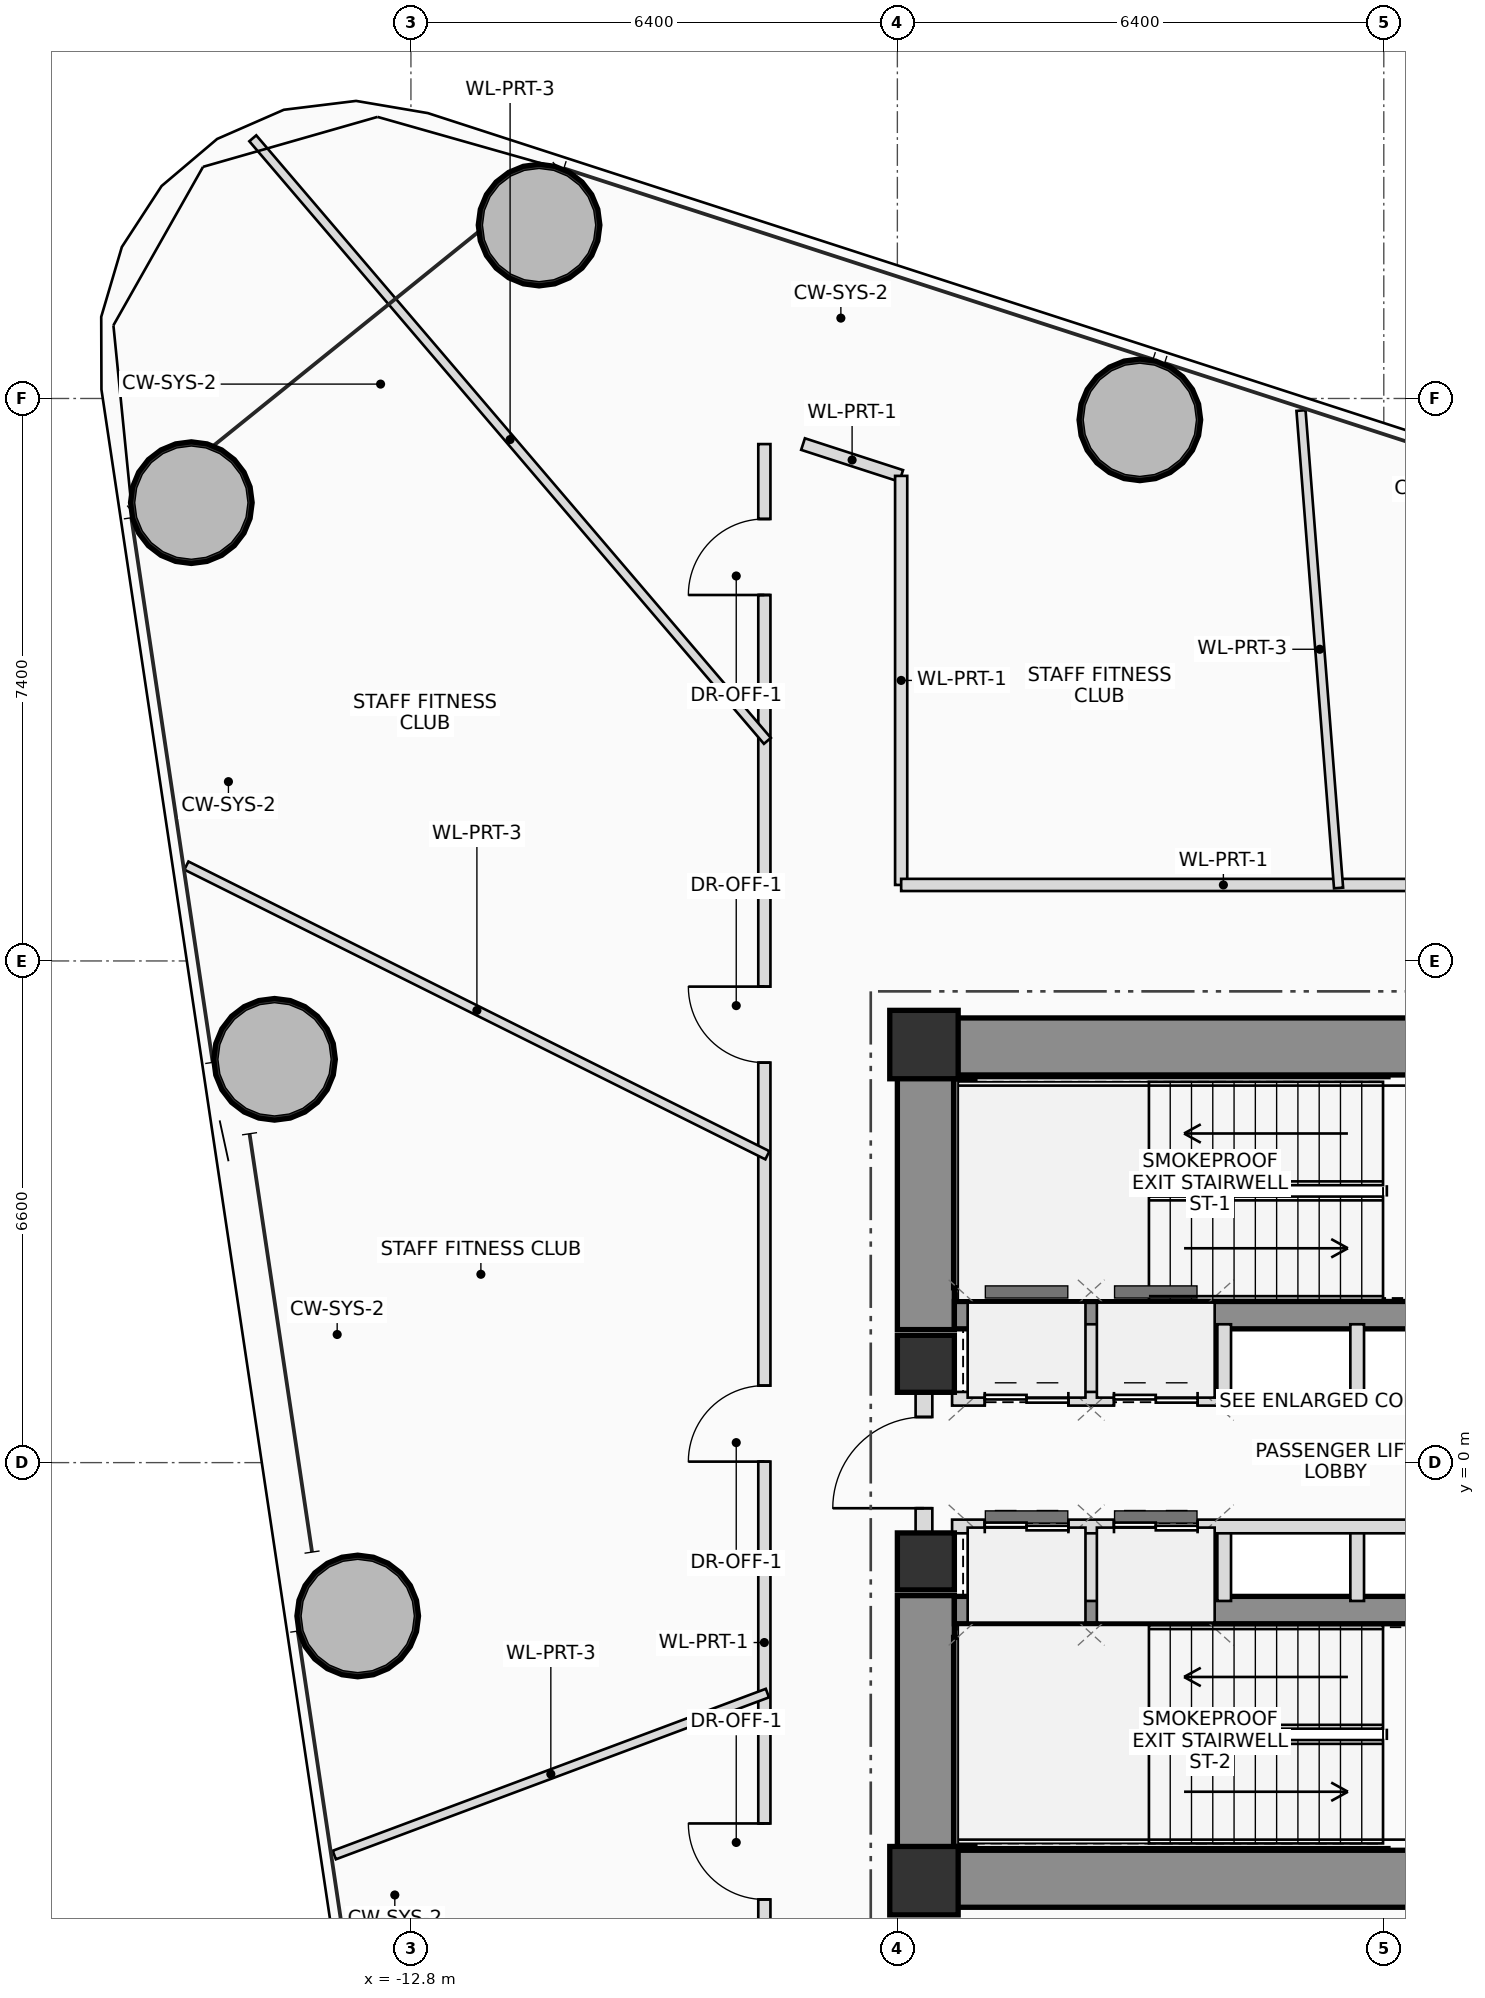
"""IFC4 building model, lengths in metres.
Left out: names, types, materials, properties, quantities, classifications, styles, units other than length and angle.
Written with IfcOpenShell. Run it as: python <this file> out.ifc"""

import sys

from ifc_helpers import new_model, si_unit, direction, frame, frame_2d, origin, origin_2d, place, context, subcontext, project, spatial, rectangle, hollow_circle, extrude, source, transform, mapped, element, fill, save


model = new_model("IFC4")
c1 = context("Model", 3, precision=1e-05, world=origin(), true_north=direction((0.0, 1.0)))
c2 = subcontext(c1, "Body", "Model", "MODEL_VIEW")
j1 = project(units=[si_unit("LENGTHUNIT", "METRE"), si_unit("PLANEANGLEUNIT", "RADIAN")], contexts=[c1])
p1 = place(None, origin())
s1 = spatial("IfcSite", under=j1, at=p1, CompositionType="ELEMENT")
p2 = place(p1, origin())
s2 = spatial("IfcBuilding", under=s1, at=p2, CompositionType="ELEMENT")
p3 = place(p2, frame((0.0, 0.0, 77.3)))
s3 = spatial("IfcBuildingStorey", under=s2, at=p3, CompositionType="ELEMENT", Elevation=77.3)
m1 = source(origin(), c2, "Body", "SweptSolid", [
    extrude(rectangle(XDim=0.9, YDim=0.9, at=origin_2d()), origin(), (0.0, 0.0, 1.0), 3.75),
])
for number, where, z_axis, x_axis in (
    (1, (-6.05, -5.5, 0.0), (0.0, 0.0, 1.0), (1.0, 0.0, 0.0)),
    (2, (-6.05, 5.5, 0.0), (0.0, 0.0, 1.0), (1.0, 0.0, 0.0)),
):
    element("IfcColumn", number, at=place(p3, frame(where, z_axis=z_axis, x_axis=x_axis)), inside=s3, PredefinedType="COLUMN", context=c2, shape_type="MappedRepresentation", body=[
        mapped(m1, transform((0.0, 0.0, 0.0), scale=1.0)),
    ])
p4 = place(p3, frame((-6.4, 5.475, 0.0), z_axis=(0.0, 0.0, 1.0), x_axis=(1.0, 0.0, 0.0)))
e3 = element("IfcWall", 3, at=p4, inside=s3, PredefinedType="SHEAR", context=c2, shape_type="SweptSolid", body=[
    extrude(rectangle(XDim=12.8, YDim=0.75, at=frame_2d((6.4, 0.0))), origin(), (0.0, 0.0, 1.0), 3.75),
])
p5 = place(p4, frame((8.6, 0.0, 0.0)))
e4 = element("IfcOpeningElement", 4, at=p5, cuts=e3, PredefinedType="OPENING", context=c2, shape_type="SweptSolid", body=[
    extrude(rectangle(XDim=1.2, YDim=2.2, at=frame_2d((0.6, 1.1))), frame((0.0, 0.385, 0.0), z_axis=(0.0, -1.0, 0.0), x_axis=(1.0, 0.0, 0.0)), (0.0, 0.0, 1.0), 0.77),
])
p6 = place(p3, frame((-6.4, -5.475, 0.0), z_axis=(0.0, 0.0, 1.0), x_axis=(1.0, 0.0, 0.0)))
e5 = element("IfcWall", 5, at=p6, inside=s3, PredefinedType="SHEAR", context=c2, shape_type="SweptSolid", body=[
    extrude(rectangle(XDim=12.8, YDim=0.75, at=frame_2d((6.4, 0.0))), origin(), (0.0, 0.0, 1.0), 3.75),
])
p7 = place(p6, frame((8.6, 0.0, 0.0)))
e6 = element("IfcOpeningElement", 6, at=p7, cuts=e5, PredefinedType="OPENING", context=c2, shape_type="SweptSolid", body=[
    extrude(rectangle(XDim=1.2, YDim=2.2, at=frame_2d((0.6, 1.1))), frame((0.0, 0.385, 0.0), z_axis=(0.0, -1.0, 0.0), x_axis=(1.0, 0.0, 0.0)), (0.0, 0.0, 1.0), 0.77),
])
for number, where, z_axis, x_axis in (
    (7, (-6.025, -5.1, 0.0), (0.0, 0.0, 1.0), (0.0, 1.0, 0.0)),
    (8, (-6.025, 1.75, 0.0), (0.0, 0.0, 1.0), (0.0, 1.0, 0.0)),
):
    element("IfcWall", number, at=place(p3, frame(where, z_axis=z_axis, x_axis=x_axis)), inside=s3, PredefinedType="SHEAR", context=c2, shape_type="SweptSolid", body=[
        extrude(rectangle(XDim=3.35, YDim=0.75, at=frame_2d((1.675, 0.0))), origin(), (0.0, 0.0, 1.0), 3.75),
    ])
for number, where, z_axis, x_axis in (
    (9, (-5.65, 1.94, 0.0), (0.0, 0.0, 1.0), (1.0, 0.0, 0.0)),
    (10, (-5.65, -1.94, 0.0), (0.0, 0.0, 1.0), (1.0, 0.0, 0.0)),
):
    element("IfcWall", number, at=place(p3, frame(where, z_axis=z_axis, x_axis=x_axis)), inside=s3, PredefinedType="SHEAR", context=c2, shape_type="SweptSolid", body=[
        extrude(rectangle(XDim=11.3, YDim=0.36, at=frame_2d((5.65, 0.0))), origin(), (0.0, 0.0, 1.0), 3.75),
    ])
for number, where, z_axis, x_axis in (
    (11, (-5.52, 2.3, 0.0), (0.0, 0.0, 1.0), (0.0, 1.0, 0.0)),
    (12, (-5.52, -5.05, 0.0), (0.0, 0.0, 1.0), (0.0, 1.0, 0.0)),
):
    element("IfcWall", number, at=place(p3, frame(where, z_axis=z_axis, x_axis=x_axis)), inside=s3, PredefinedType="SHEAR", context=c2, shape_type="SweptSolid", body=[
        extrude(rectangle(XDim=2.75, YDim=0.28, at=frame_2d((1.375, 0.0))), origin(), (0.0, 0.0, 1.0), 3.75),
    ])
m2 = source(origin(), c2, "Body", "SweptSolid", [
    extrude(rectangle(XDim=0.75, YDim=0.75, at=origin_2d()), origin(), (0.0, 0.0, 1.0), 3.75),
])
for number, where, z_axis, x_axis in (
    (13, (-6.025, -1.3, 0.0), (0.0, 0.0, 1.0), (1.0, 0.0, 0.0)),
    (14, (-6.025, 1.3, 0.0), (0.0, 0.0, 1.0), (1.0, 0.0, 0.0)),
):
    element("IfcColumn", number, at=place(p3, frame(where, z_axis=z_axis, x_axis=x_axis)), inside=s3, PredefinedType="COLUMN", context=c2, shape_type="MappedRepresentation", body=[
        mapped(m2, transform((0.0, 0.0, 0.0), scale=1.0)),
    ])
m3 = source(origin(), c2, "Body", "SweptSolid", [
    extrude(hollow_circle(Radius=0.8, WallThickness=0.055, at=origin_2d()), origin(), (0.0, 0.0, 1.0), 3.75),
])
for number, where, z_axis, x_axis in (
    (15, (-3.21, 13.719, 0.0), (0.0, 0.0, 1.0), (1.0, 0.0, 0.0)),
    (16, (-11.114, 16.281, 0.0), (0.0, 0.0, 1.0), (1.0, 0.0, 0.0)),
    (17, (-15.689, 12.629, 0.0), (0.0, 0.0, 1.0), (1.0, 0.0, 0.0)),
    (18, (-14.594, 5.306, 0.0), (0.0, 0.0, 1.0), (1.0, 0.0, 0.0)),
    (19, (-13.5, -2.018, 0.0), (0.0, 0.0, 1.0), (1.0, 0.0, 0.0)),
):
    element("IfcColumn", number, at=place(p3, frame(where, z_axis=z_axis, x_axis=x_axis)), inside=s3, PredefinedType="COLUMN", context=c2, shape_type="MappedRepresentation", body=[
        mapped(m3, transform((0.0, 0.0, 0.0), scale=1.0)),
    ])
p8 = place(p3, frame((-6.05, -0.95, 0.0), z_axis=(0.0, 0.0, 1.0), x_axis=(0.0, 1.0, 0.0)))
e20 = element("IfcWall", 20, at=p8, inside=s3, PredefinedType="PLUMBINGWALL", context=c2, shape_type="SweptSolid", body=[
    extrude(rectangle(XDim=1.9, YDim=0.22, at=frame_2d((0.95, 0.0))), origin(), (0.0, 0.0, 1.0), 2.525),
])
p9 = place(p8, frame((0.35, 0.0, 0.0)))
e21 = element("IfcOpeningElement", 21, at=p9, cuts=e20, PredefinedType="OPENING", context=c2, shape_type="SweptSolid", body=[
    extrude(rectangle(XDim=1.2, YDim=2.2, at=frame_2d((0.6, 1.1))), frame((0.0, 0.12, 0.0), z_axis=(0.0, -1.0, 0.0), x_axis=(1.0, 0.0, 0.0)), (0.0, 0.0, 1.0), 0.24),
])
for number, where, z_axis, x_axis in (
    (22, (-3.85, 0.84, 0.0), (0.0, 0.0, 1.0), (0.0, 1.0, 0.0)),
    (23, (-3.85, -1.82, 0.0), (0.0, 0.0, 1.0), (0.0, 1.0, 0.0)),
    (24, (-2.1, 0.84, 0.0), (0.0, 0.0, 1.0), (0.0, 1.0, 0.0)),
    (25, (-2.1, -1.82, 0.0), (0.0, 0.0, 1.0), (0.0, 1.0, 0.0)),
    (26, (-0.35, 0.84, 0.0), (0.0, 0.0, 1.0), (0.0, 1.0, 0.0)),
    (27, (-0.35, -1.82, 0.0), (0.0, 0.0, 1.0), (0.0, 1.0, 0.0)),
):
    element("IfcWall", number, at=place(p3, frame(where, z_axis=z_axis, x_axis=x_axis)), inside=s3, PredefinedType="PLUMBINGWALL", context=c2, shape_type="SweptSolid", body=[
        extrude(rectangle(XDim=0.98, YDim=0.18, at=frame_2d((0.49, 0.0))), origin(), (0.0, 0.0, 1.0), 3.545),
    ])
p10 = place(p3, frame((-5.68, 0.84, 0.0), z_axis=(0.0, 0.0, 1.0), x_axis=(1.0, 0.0, 0.0)))
e28 = element("IfcWall", 28, at=p10, inside=s3, PredefinedType="PLUMBINGWALL", context=c2, shape_type="SweptSolid", body=[
    extrude(rectangle(XDim=10.26, YDim=0.18, at=frame_2d((5.13, 0.0))), origin(), (0.0, 0.0, 1.0), 3.545),
])
p11 = place(p10, frame((0.43, 0.0, 0.0)))
e29 = element("IfcOpeningElement", 29, at=p11, cuts=e28, PredefinedType="OPENING", context=c2, shape_type="SweptSolid", body=[
    extrude(rectangle(XDim=1.1, YDim=2.2, at=frame_2d((0.55, 1.1))), frame((0.0, 0.1, 0.0), z_axis=(0.0, -1.0, 0.0), x_axis=(1.0, 0.0, 0.0)), (0.0, 0.0, 1.0), 0.2),
])
p12 = place(p10, frame((2.13, 0.0, 0.0)))
e30 = element("IfcOpeningElement", 30, at=p12, cuts=e28, PredefinedType="OPENING", context=c2, shape_type="SweptSolid", body=[
    extrude(rectangle(XDim=1.1, YDim=2.2, at=frame_2d((0.55, 1.1))), frame((0.0, 0.1, 0.0), z_axis=(0.0, -1.0, 0.0), x_axis=(1.0, 0.0, 0.0)), (0.0, 0.0, 1.0), 0.2),
])
p13 = place(p3, frame((-5.68, -0.84, 0.0), z_axis=(0.0, 0.0, 1.0), x_axis=(1.0, 0.0, 0.0)))
e31 = element("IfcWall", 31, at=p13, inside=s3, PredefinedType="PLUMBINGWALL", context=c2, shape_type="SweptSolid", body=[
    extrude(rectangle(XDim=8.7, YDim=0.18, at=frame_2d((4.35, 0.0))), origin(), (0.0, 0.0, 1.0), 3.545),
])
p14 = place(p13, frame((0.43, 0.0, 0.0)))
e32 = element("IfcOpeningElement", 32, at=p14, cuts=e31, PredefinedType="OPENING", context=c2, shape_type="SweptSolid", body=[
    extrude(rectangle(XDim=1.1, YDim=2.2, at=frame_2d((0.55, 1.1))), frame((0.0, 0.1, 0.0), z_axis=(0.0, -1.0, 0.0), x_axis=(1.0, 0.0, 0.0)), (0.0, 0.0, 1.0), 0.2),
])
p15 = place(p13, frame((2.13, 0.0, 0.0)))
e33 = element("IfcOpeningElement", 33, at=p15, cuts=e31, PredefinedType="OPENING", context=c2, shape_type="SweptSolid", body=[
    extrude(rectangle(XDim=1.1, YDim=2.2, at=frame_2d((0.55, 1.1))), frame((0.0, 0.1, 0.0), z_axis=(0.0, -1.0, 0.0), x_axis=(1.0, 0.0, 0.0)), (0.0, 0.0, 1.0), 0.2),
])
p16 = place(p3, frame((-8.15, -7.6, 0.0), z_axis=(0.0, 0.0, 1.0), x_axis=(0.0, 1.0, 0.0)))
e34 = element("IfcWall", 34, at=p16, inside=s3, PredefinedType="PARTITIONING", context=c2, shape_type="SweptSolid", body=[
    extrude(rectangle(XDim=15.2, YDim=0.16, at=frame_2d((7.6, 0.0))), origin(), (0.0, 0.0, 1.0), 2.85),
])
p17 = place(p16, frame((1.853, 0.0, 0.0)))
e35 = element("IfcOpeningElement", 35, at=p17, cuts=e34, PredefinedType="OPENING", context=c2, shape_type="SweptSolid", body=[
    extrude(rectangle(XDim=1.0, YDim=2.25, at=frame_2d((0.5, 1.125))), frame((0.0, 0.09, 0.0), z_axis=(0.0, -1.0, 0.0), x_axis=(1.0, 0.0, 0.0)), (0.0, 0.0, 1.0), 0.18),
])
p18 = place(p16, frame((7.613, 0.0, 0.0)))
e36 = element("IfcOpeningElement", 36, at=p18, cuts=e34, PredefinedType="OPENING", context=c2, shape_type="SweptSolid", body=[
    extrude(rectangle(XDim=1.0, YDim=2.25, at=frame_2d((0.5, 1.125))), frame((0.0, 0.09, 0.0), z_axis=(0.0, -1.0, 0.0), x_axis=(1.0, 0.0, 0.0)), (0.0, 0.0, 1.0), 0.18),
])
p19 = place(p16, frame((12.862, 0.0, 0.0)))
e37 = element("IfcOpeningElement", 37, at=p19, cuts=e34, PredefinedType="OPENING", context=c2, shape_type="SweptSolid", body=[
    extrude(rectangle(XDim=1.0, YDim=2.25, at=frame_2d((0.5, 1.125))), frame((0.0, 0.09, 0.0), z_axis=(0.0, -1.0, 0.0), x_axis=(1.0, 0.0, 0.0)), (0.0, 0.0, 1.0), 0.18),
])
p20 = place(p3, frame((-8.15, 7.6, 0.0), z_axis=(0.0, 0.0, 1.0), x_axis=(0.0, 1.0, 0.0)))
e38 = element("IfcWall", 38, at=p20, inside=s3, PredefinedType="PARTITIONING", context=c2, shape_type="SweptSolid", body=[
    extrude(rectangle(XDim=5.8, YDim=0.16, at=frame_2d((2.9, 0.0))), origin(), (0.0, 0.0, 1.0), 2.85),
])
p21 = place(p20, frame((3.815, 0.0, 0.0)))
e39 = element("IfcOpeningElement", 39, at=p21, cuts=e38, PredefinedType="OPENING", context=c2, shape_type="SweptSolid", body=[
    extrude(rectangle(XDim=1.0, YDim=2.25, at=frame_2d((0.5, 1.125))), frame((0.0, 0.09, 0.0), z_axis=(0.0, -1.0, 0.0), x_axis=(1.0, 0.0, 0.0)), (0.0, 0.0, 1.0), 0.18),
])
p22 = place(p3, frame((-7.641, 13.4, 0.0), z_axis=(0.0, 0.0, 1.0), x_axis=(0.951277022007, -0.308337521884, 0.0)))
e40 = element("IfcWall", 40, at=p22, inside=s3, PredefinedType="PARTITIONING", context=c2, shape_type="SweptSolid", body=[
    extrude(rectangle(XDim=1.357, YDim=0.16, at=frame_2d((0.679, 0.0))), origin(), (0.0, 0.0, 1.0), 3.545),
])
p23 = place(p3, frame((-6.35, 12.981, 0.0), z_axis=(0.0, 0.0, 1.0), x_axis=(0.0, -1.0, 0.0)))
e41 = element("IfcWall", 41, at=p23, inside=s3, PredefinedType="PARTITIONING", context=c2, shape_type="SweptSolid", body=[
    extrude(rectangle(XDim=5.381, YDim=0.16, at=frame_2d((2.691, 0.0))), origin(), (0.0, 0.0, 1.0), 3.05),
])
p24 = place(p3, frame((-6.35, 7.6, 0.0), z_axis=(0.0, 0.0, 1.0), x_axis=(1.0, 0.0, 0.0)))
e42 = element("IfcWall", 42, at=p24, inside=s3, PredefinedType="PARTITIONING", context=c2, shape_type="SweptSolid", body=[
    extrude(rectangle(XDim=12.7, YDim=0.16, at=frame_2d((6.35, 0.0))), origin(), (0.0, 0.0, 1.0), 2.85),
])
p25 = place(p24, frame((8.629, 0.0, 0.0)))
e43 = element("IfcOpeningElement", 43, at=p25, cuts=e42, PredefinedType="OPENING", context=c2, shape_type="SweptSolid", body=[
    extrude(rectangle(XDim=1.0, YDim=2.25, at=frame_2d((0.5, 1.125))), frame((0.0, 0.09, 0.0), z_axis=(0.0, -1.0, 0.0), x_axis=(1.0, 0.0, 0.0)), (0.0, 0.0, 1.0), 0.18),
])
p26 = place(p3, frame((-8.11, 9.496, 0.0), z_axis=(0.0, 0.0, 1.0), x_axis=(-0.649436485197, 0.760415841297, 0.0)))
e44 = element("IfcWall", 44, at=p26, inside=s3, PredefinedType="PARTITIONING", context=c2, shape_type="SweptSolid", body=[
    extrude(rectangle(XDim=10.425, YDim=0.12, at=frame_2d((5.213, 0.0))), origin(), (0.0, 0.0, 1.0), 2.85),
])
p27 = place(p3, frame((-8.11, 4.043, 0.0), z_axis=(0.0, 0.0, 1.0), x_axis=(-0.894929683648, 0.44620719551, 0.0)))
e45 = element("IfcWall", 45, at=p27, inside=s3, PredefinedType="PARTITIONING", context=c2, shape_type="SweptSolid", body=[
    extrude(rectangle(XDim=8.542, YDim=0.12, at=frame_2d((4.271, 0.0))), origin(), (0.0, 0.0, 1.0), 2.85),
])
p28 = place(p3, frame((-8.11, -3.032, 0.0), z_axis=(0.0, 0.0, 1.0), x_axis=(-0.936670113357, -0.350212933433, 0.0)))
e46 = element("IfcWall", 46, at=p28, inside=s3, PredefinedType="PARTITIONING", context=c2, shape_type="SweptSolid", body=[
    extrude(rectangle(XDim=6.084, YDim=0.12, at=frame_2d((3.042, 0.0))), origin(), (0.0, 0.0, 1.0), 2.85),
])
p29 = place(p3, frame((-0.595, 7.56, 0.0), z_axis=(0.0, 0.0, 1.0), x_axis=(-0.07846535306, 0.996916841251, 0.0)))
e47 = element("IfcWall", 47, at=p29, inside=s3, PredefinedType="PARTITIONING", context=c2, shape_type="SweptSolid", body=[
    extrude(rectangle(XDim=6.301, YDim=0.12, at=frame_2d((3.15, 0.0))), origin(), (0.0, 0.0, 1.0), 3.01),
])
p30 = place(p9, origin())
e48 = element("IfcDoor", 48, at=p30, inside=s3, OperationType="SINGLE_SWING_LEFT", PredefinedType="DOOR", context=c2, shape_type="SweptSolid", body=[
    extrude(rectangle(XDim=1.2, YDim=2.2, at=frame_2d((0.6, 1.1))), frame((0.0, 0.025, 0.0), z_axis=(0.0, -1.0, 0.0), x_axis=(1.0, 0.0, 0.0)), (0.0, 0.0, 1.0), 0.05),
])
fill(e21, e48)
p31 = place(p11, origin())
e49 = element("IfcDoor", 49, at=p31, inside=s3, OperationType="DOUBLE_DOOR_SLIDING", PredefinedType="DOOR", context=c2, shape_type="SweptSolid", body=[
    extrude(rectangle(XDim=1.1, YDim=2.2, at=frame_2d((0.55, 1.1))), frame((0.0, 0.025, 0.0), z_axis=(0.0, -1.0, 0.0), x_axis=(1.0, 0.0, 0.0)), (0.0, 0.0, 1.0), 0.05),
])
fill(e29, e49)
p32 = place(p12, origin())
e50 = element("IfcDoor", 50, at=p32, inside=s3, OperationType="DOUBLE_DOOR_SLIDING", PredefinedType="DOOR", context=c2, shape_type="SweptSolid", body=[
    extrude(rectangle(XDim=1.1, YDim=2.2, at=frame_2d((0.55, 1.1))), frame((0.0, 0.025, 0.0), z_axis=(0.0, -1.0, 0.0), x_axis=(1.0, 0.0, 0.0)), (0.0, 0.0, 1.0), 0.05),
])
fill(e30, e50)
p33 = place(p14, origin())
e51 = element("IfcDoor", 51, at=p33, inside=s3, OperationType="DOUBLE_DOOR_SLIDING", PredefinedType="DOOR", context=c2, shape_type="SweptSolid", body=[
    extrude(rectangle(XDim=1.1, YDim=2.2, at=frame_2d((0.55, 1.1))), frame((0.0, 0.025, 0.0), z_axis=(0.0, -1.0, 0.0), x_axis=(1.0, 0.0, 0.0)), (0.0, 0.0, 1.0), 0.05),
])
fill(e32, e51)
p34 = place(p15, origin())
e52 = element("IfcDoor", 52, at=p34, inside=s3, OperationType="DOUBLE_DOOR_SLIDING", PredefinedType="DOOR", context=c2, shape_type="SweptSolid", body=[
    extrude(rectangle(XDim=1.1, YDim=2.2, at=frame_2d((0.55, 1.1))), frame((0.0, 0.025, 0.0), z_axis=(0.0, -1.0, 0.0), x_axis=(1.0, 0.0, 0.0)), (0.0, 0.0, 1.0), 0.05),
])
fill(e33, e52)
p35 = place(p17, origin())
e53 = element("IfcDoor", 53, at=p35, inside=s3, OperationType="SINGLE_SWING_RIGHT", PredefinedType="DOOR", context=c2, shape_type="SweptSolid", body=[
    extrude(rectangle(XDim=1.0, YDim=2.25, at=frame_2d((0.5, 1.125))), frame((0.0, 0.025, 0.0), z_axis=(0.0, -1.0, 0.0), x_axis=(1.0, 0.0, 0.0)), (0.0, 0.0, 1.0), 0.05),
])
fill(e35, e53)
p36 = place(p18, origin())
e54 = element("IfcDoor", 54, at=p36, inside=s3, OperationType="SINGLE_SWING_LEFT", PredefinedType="DOOR", context=c2, shape_type="SweptSolid", body=[
    extrude(rectangle(XDim=1.0, YDim=2.25, at=frame_2d((0.5, 1.125))), frame((0.0, 0.025, 0.0), z_axis=(0.0, -1.0, 0.0), x_axis=(1.0, 0.0, 0.0)), (0.0, 0.0, 1.0), 0.05),
])
fill(e36, e54)
p37 = place(p19, origin())
e55 = element("IfcDoor", 55, at=p37, inside=s3, OperationType="SINGLE_SWING_RIGHT", PredefinedType="DOOR", context=c2, shape_type="SweptSolid", body=[
    extrude(rectangle(XDim=1.0, YDim=2.25, at=frame_2d((0.5, 1.125))), frame((0.0, 0.025, 0.0), z_axis=(0.0, -1.0, 0.0), x_axis=(1.0, 0.0, 0.0)), (0.0, 0.0, 1.0), 0.05),
])
fill(e37, e55)
p38 = place(p21, origin())
e56 = element("IfcDoor", 56, at=p38, inside=s3, OperationType="SINGLE_SWING_LEFT", PredefinedType="DOOR", context=c2, shape_type="SweptSolid", body=[
    extrude(rectangle(XDim=1.0, YDim=2.25, at=frame_2d((0.5, 1.125))), frame((0.0, 0.025, 0.0), z_axis=(0.0, -1.0, 0.0), x_axis=(1.0, 0.0, 0.0)), (0.0, 0.0, 1.0), 0.05),
])
fill(e39, e56)
save(model, sys.argv[1])
